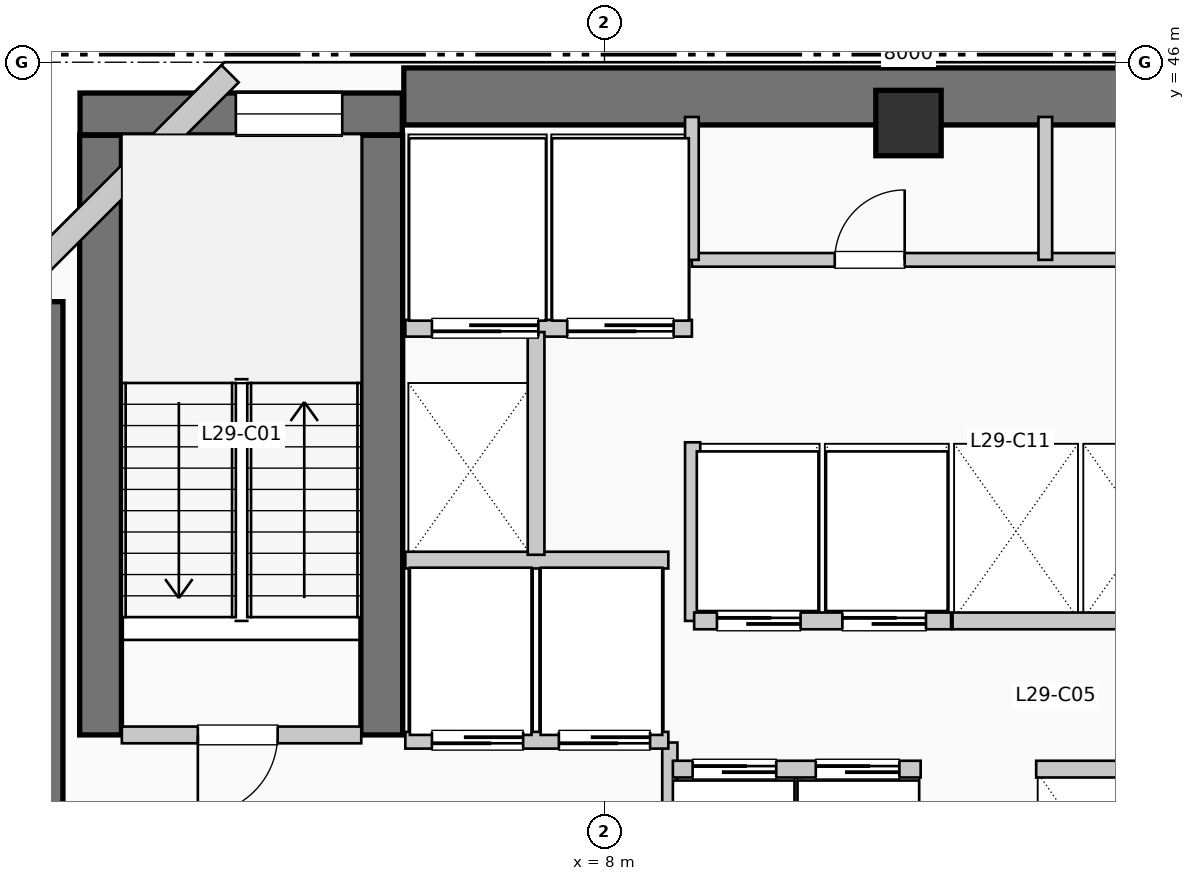
"""IFC4 building model, lengths in metres.
Left out: names, types, materials, properties, quantities, classifications, styles, units other than length and angle.
Written with IfcOpenShell. Run it as: python <this file> out.ifc"""

import sys

from ifc_helpers import new_model, si_unit, direction, frame, frame_2d, origin, origin_2d, place, context, subcontext, project, spatial, rectangle, extrude, element, fill, save


model = new_model("IFC4")
c1 = context("Model", 3, precision=1e-05, world=origin(), true_north=direction((0.0, 1.0)))
c2 = subcontext(c1, "Body", "Model", "MODEL_VIEW")
j1 = project(units=[si_unit("LENGTHUNIT", "METRE"), si_unit("PLANEANGLEUNIT", "RADIAN")], contexts=[c1])
p1 = place(None, origin())
s1 = spatial("IfcSite", under=j1, at=p1, CompositionType="ELEMENT")
p2 = place(p1, origin())
s2 = spatial("IfcBuilding", under=s1, at=p2, CompositionType="ELEMENT")
p3 = place(p2, frame((0.0, 0.0, 122.43)))
s3 = spatial("IfcBuildingStorey", under=s2, at=p3, CompositionType="ELEMENT", Elevation=122.43)
p4 = place(p3, frame((5.36, 45.55, 0.0), z_axis=(0.0, 0.0, 1.0), x_axis=(1.0, 0.0, 0.0)))
e1 = element("IfcWall", 1, at=p4, inside=s3, PredefinedType="SHEAR", context=c2, shape_type="SweptSolid", body=[
    extrude(rectangle(XDim=13.98, YDim=0.75, at=frame_2d((6.99, 0.0))), origin(), (0.0, 0.0, 1.0), 3.96),
])
p5 = place(p3, frame((0.5, 34.95, 0.0), z_axis=(0.0, 0.0, 1.0), x_axis=(0.0, 1.0, 0.0)))
e2 = element("IfcWall", 2, at=p5, inside=s3, PredefinedType="SHEAR", context=c2, shape_type="SweptSolid", body=[
    extrude(rectangle(XDim=7.9, YDim=0.75, at=frame_2d((3.95, 0.0))), origin(), (0.0, 0.0, 1.0), 3.96),
])
for number, where, z_axis, x_axis in (
    (3, (1.37, 37.15, 0.0), (0.0, 0.0, 1.0), (0.0, 1.0, 0.0)),
    (4, (5.07, 37.15, 0.0), (0.0, 0.0, 1.0), (0.0, 1.0, 0.0)),
):
    element("IfcWall", number, at=place(p3, frame(where, z_axis=z_axis, x_axis=x_axis)), inside=s3, PredefinedType="SHEAR", context=c2, shape_type="SweptSolid", body=[
        extrude(rectangle(XDim=7.89, YDim=0.55, at=frame_2d((3.945, 0.0))), origin(), (0.0, 0.0, 1.0), 3.96),
    ])
p6 = place(p3, frame((1.1, 45.32, 0.0), z_axis=(0.0, 0.0, 1.0), x_axis=(1.0, 0.0, 0.0)))
e5 = element("IfcWall", 5, at=p6, inside=s3, PredefinedType="SHEAR", context=c2, shape_type="SweptSolid", body=[
    extrude(rectangle(XDim=4.24, YDim=0.55, at=frame_2d((2.12, 0.0))), origin(), (0.0, 0.0, 1.0), 3.96),
])
p7 = place(p6, frame((2.05, 0.0, 1.05)))
e6 = element("IfcOpeningElement", 6, at=p7, cuts=e5, PredefinedType="OPENING", context=c2, shape_type="SweptSolid", body=[
    extrude(rectangle(XDim=1.4, YDim=1.8, at=frame_2d((0.7, 0.9))), frame((0.0, 0.285, 0.0), z_axis=(0.0, -1.0, 0.0), x_axis=(1.0, 0.0, 0.0)), (0.0, 0.0, 1.0), 0.57),
])
p8 = place(p3, frame((12.0, 45.2, 0.0), z_axis=(0.0, 0.0, 1.0), x_axis=(1.0, 0.0, 0.0)))
e7 = element("IfcColumn", 7, at=p8, inside=s3, PredefinedType="COLUMN", context=c2, shape_type="SweptSolid", body=[
    extrude(rectangle(XDim=0.86, YDim=0.86, at=origin_2d()), origin(), (0.0, 0.0, 1.0), 3.96),
])
p9 = place(p3, frame((3.074, 45.848, 0.0), z_axis=(0.0, 0.0, 1.0), x_axis=(-0.707106781187, -0.707106781187, 0.0)))
e8 = element("IfcWall", 8, at=p9, inside=s3, PredefinedType="SOLIDWALL", context=c2, shape_type="SweptSolid", body=[
    extrude(rectangle(XDim=4.133, YDim=0.32, at=frame_2d((2.066, 0.0))), origin(), (0.0, 0.0, 1.0), 3.71),
])
p10 = place(p3, frame((1.65, 37.15, 0.0), z_axis=(0.0, 0.0, 1.0), x_axis=(1.0, 0.0, 0.0)))
e9 = element("IfcWall", 9, at=p10, inside=s3, PredefinedType="PARTITIONING", context=c2, shape_type="SweptSolid", body=[
    extrude(rectangle(XDim=3.15, YDim=0.22, at=frame_2d((1.575, 0.0))), origin(), (0.0, 0.0, 1.0), 3.71),
])
p11 = place(p10, frame((2.05, 0.0, 0.0), z_axis=(0.0, 0.0, 1.0), x_axis=(-1.0, 0.0, 0.0)))
e10 = element("IfcOpeningElement", 10, at=p11, cuts=e9, PredefinedType="OPENING", context=c2, shape_type="SweptSolid", body=[
    extrude(rectangle(XDim=1.05, YDim=2.15, at=frame_2d((0.525, 1.075))), frame((0.0, 0.12, 0.0), z_axis=(0.0, -1.0, 0.0), x_axis=(1.0, 0.0, 0.0)), (0.0, 0.0, 1.0), 0.24),
])
p12 = place(p3, frame((8.86, 34.55, 0.0), z_axis=(0.0, 0.0, 1.0), x_axis=(0.0, 1.0, 0.0)))
e11 = element("IfcWall", 11, at=p12, inside=s3, PredefinedType="PARTITIONING", context=c2, shape_type="SweptSolid", body=[
    extrude(rectangle(XDim=2.5, YDim=0.2, at=frame_2d((1.25, 0.0))), origin(), (0.0, 0.0, 1.0), 3.71),
])
p13 = place(p3, frame((5.38, 37.08, 0.0), z_axis=(0.0, 0.0, 1.0), x_axis=(1.0, 0.0, 0.0)))
e12 = element("IfcWall", 12, at=p13, inside=s3, PredefinedType="PARTITIONING", context=c2, shape_type="SweptSolid", body=[
    extrude(rectangle(XDim=3.46, YDim=0.22, at=frame_2d((1.73, 0.0))), origin(), (0.0, 0.0, 1.0), 3.71),
])
p14 = place(p13, frame((1.55, 0.0, 0.0), z_axis=(0.0, 0.0, 1.0), x_axis=(-1.0, 0.0, 0.0)))
e13 = element("IfcOpeningElement", 13, at=p14, cuts=e12, PredefinedType="OPENING", context=c2, shape_type="SweptSolid", body=[
    extrude(rectangle(XDim=1.2, YDim=2.2, at=frame_2d((0.6, 1.1))), frame((0.0, 0.12, 0.0), z_axis=(0.0, -1.0, 0.0), x_axis=(1.0, 0.0, 0.0)), (0.0, 0.0, 1.0), 0.24),
])
p15 = place(p13, frame((3.22, 0.0, 0.0), z_axis=(0.0, 0.0, 1.0), x_axis=(-1.0, 0.0, 0.0)))
e14 = element("IfcOpeningElement", 14, at=p15, cuts=e12, PredefinedType="OPENING", context=c2, shape_type="SweptSolid", body=[
    extrude(rectangle(XDim=1.2, YDim=2.2, at=frame_2d((0.6, 1.1))), frame((0.0, 0.12, 0.0), z_axis=(0.0, -1.0, 0.0), x_axis=(1.0, 0.0, 0.0)), (0.0, 0.0, 1.0), 0.24),
])
p16 = place(p3, frame((5.38, 39.45, 0.0), z_axis=(0.0, 0.0, 1.0), x_axis=(1.0, 0.0, 0.0)))
e15 = element("IfcWall", 15, at=p16, inside=s3, PredefinedType="PARTITIONING", context=c2, shape_type="SweptSolid", body=[
    extrude(rectangle(XDim=3.46, YDim=0.22, at=frame_2d((1.73, 0.0))), origin(), (0.0, 0.0, 1.0), 3.71),
])
p17 = place(p3, frame((5.38, 42.5, 0.0), z_axis=(0.0, 0.0, 1.0), x_axis=(1.0, 0.0, 0.0)))
e16 = element("IfcWall", 16, at=p17, inside=s3, PredefinedType="PARTITIONING", context=c2, shape_type="SweptSolid", body=[
    extrude(rectangle(XDim=3.77, YDim=0.22, at=frame_2d((1.885, 0.0))), origin(), (0.0, 0.0, 1.0), 3.71),
])
p18 = place(p17, frame((1.75, 0.0, 0.0), z_axis=(0.0, 0.0, 1.0), x_axis=(-1.0, 0.0, 0.0)))
e17 = element("IfcOpeningElement", 17, at=p18, cuts=e16, PredefinedType="OPENING", context=c2, shape_type="SweptSolid", body=[
    extrude(rectangle(XDim=1.4, YDim=2.2, at=frame_2d((0.7, 1.1))), frame((0.0, 0.12, 0.0), z_axis=(0.0, -1.0, 0.0), x_axis=(1.0, 0.0, 0.0)), (0.0, 0.0, 1.0), 0.24),
])
p19 = place(p17, frame((3.53, 0.0, 0.0), z_axis=(0.0, 0.0, 1.0), x_axis=(-1.0, 0.0, 0.0)))
e18 = element("IfcOpeningElement", 18, at=p19, cuts=e16, PredefinedType="OPENING", context=c2, shape_type="SweptSolid", body=[
    extrude(rectangle(XDim=1.4, YDim=2.2, at=frame_2d((0.7, 1.1))), frame((0.0, 0.12, 0.0), z_axis=(0.0, -1.0, 0.0), x_axis=(1.0, 0.0, 0.0)), (0.0, 0.0, 1.0), 0.24),
])
p20 = place(p3, frame((7.1, 39.52, 0.0), z_axis=(0.0, 0.0, 1.0), x_axis=(0.0, 1.0, 0.0)))
e19 = element("IfcWall", 19, at=p20, inside=s3, PredefinedType="PARTITIONING", context=c2, shape_type="SweptSolid", body=[
    extrude(rectangle(XDim=2.93, YDim=0.22, at=frame_2d((1.465, 0.0))), origin(), (0.0, 0.0, 1.0), 3.71),
])
p21 = place(p3, frame((9.16, 38.65, 0.0), z_axis=(0.0, 0.0, 1.0), x_axis=(0.0, 1.0, 0.0)))
e20 = element("IfcWall", 20, at=p21, inside=s3, PredefinedType="PARTITIONING", context=c2, shape_type="SweptSolid", body=[
    extrude(rectangle(XDim=2.35, YDim=0.2, at=frame_2d((1.175, 0.0))), origin(), (0.0, 0.0, 1.0), 3.71),
])
p22 = place(p3, frame((8.9, 36.7, 0.0), z_axis=(0.0, 0.0, 1.0), x_axis=(1.0, 0.0, 0.0)))
e21 = element("IfcWall", 21, at=p22, inside=s3, PredefinedType="PARTITIONING", context=c2, shape_type="SweptSolid", body=[
    extrude(rectangle(XDim=3.26, YDim=0.22, at=frame_2d((1.63, 0.0))), origin(), (0.0, 0.0, 1.0), 3.71),
])
p23 = place(p22, frame((0.26, 0.0, 0.0)))
e22 = element("IfcOpeningElement", 22, at=p23, cuts=e21, PredefinedType="OPENING", context=c2, shape_type="SweptSolid", body=[
    extrude(rectangle(XDim=1.1, YDim=2.2, at=frame_2d((0.55, 1.1))), frame((0.0, 0.12, 0.0), z_axis=(0.0, -1.0, 0.0), x_axis=(1.0, 0.0, 0.0)), (0.0, 0.0, 1.0), 0.24),
])
p24 = place(p22, frame((1.88, 0.0, 0.0)))
e23 = element("IfcOpeningElement", 23, at=p24, cuts=e21, PredefinedType="OPENING", context=c2, shape_type="SweptSolid", body=[
    extrude(rectangle(XDim=1.1, YDim=2.2, at=frame_2d((0.55, 1.1))), frame((0.0, 0.12, 0.0), z_axis=(0.0, -1.0, 0.0), x_axis=(1.0, 0.0, 0.0)), (0.0, 0.0, 1.0), 0.24),
])
p25 = place(p3, frame((9.18, 38.65, 0.0), z_axis=(0.0, 0.0, 1.0), x_axis=(1.0, 0.0, 0.0)))
e24 = element("IfcWall", 24, at=p25, inside=s3, PredefinedType="PARTITIONING", context=c2, shape_type="SweptSolid", body=[
    extrude(rectangle(XDim=3.38, YDim=0.22, at=frame_2d((1.69, 0.0))), origin(), (0.0, 0.0, 1.0), 3.71),
])
p26 = place(p25, frame((0.3, 0.0, 0.0)))
e25 = element("IfcOpeningElement", 25, at=p26, cuts=e24, PredefinedType="OPENING", context=c2, shape_type="SweptSolid", body=[
    extrude(rectangle(XDim=1.1, YDim=2.2, at=frame_2d((0.55, 1.1))), frame((0.0, 0.12, 0.0), z_axis=(0.0, -1.0, 0.0), x_axis=(1.0, 0.0, 0.0)), (0.0, 0.0, 1.0), 0.24),
])
p27 = place(p25, frame((1.95, 0.0, 0.0)))
e26 = element("IfcOpeningElement", 26, at=p27, cuts=e24, PredefinedType="OPENING", context=c2, shape_type="SweptSolid", body=[
    extrude(rectangle(XDim=1.1, YDim=2.2, at=frame_2d((0.55, 1.1))), frame((0.0, 0.12, 0.0), z_axis=(0.0, -1.0, 0.0), x_axis=(1.0, 0.0, 0.0)), (0.0, 0.0, 1.0), 0.24),
])
p28 = place(p3, frame((13.68, 36.7, 0.0), z_axis=(0.0, 0.0, 1.0), x_axis=(1.0, 0.0, 0.0)))
e27 = element("IfcWall", 27, at=p28, inside=s3, PredefinedType="PARTITIONING", context=c2, shape_type="SweptSolid", body=[
    extrude(rectangle(XDim=3.28, YDim=0.22, at=frame_2d((1.64, 0.0))), origin(), (0.0, 0.0, 1.0), 3.71),
])
p29 = place(p3, frame((12.58, 38.65, 0.0), z_axis=(0.0, 0.0, 1.0), x_axis=(1.0, 0.0, 0.0)))
e28 = element("IfcWall", 28, at=p29, inside=s3, PredefinedType="PARTITIONING", context=c2, shape_type="SweptSolid", body=[
    extrude(rectangle(XDim=3.38, YDim=0.22, at=frame_2d((1.69, 0.0))), origin(), (0.0, 0.0, 1.0), 3.71),
])
p30 = place(p3, frame((9.15, 43.4, 0.0), z_axis=(0.0, 0.0, 1.0), x_axis=(1.0, 0.0, 0.0)))
e29 = element("IfcWall", 29, at=p30, inside=s3, PredefinedType="PLUMBINGWALL", context=c2, shape_type="SweptSolid", body=[
    extrude(rectangle(XDim=9.33, YDim=0.18, at=frame_2d((4.665, 0.0))), origin(), (0.0, 0.0, 1.0), 3.71),
])
p31 = place(p30, frame((1.88, 0.0, 0.0)))
e30 = element("IfcOpeningElement", 30, at=p31, cuts=e29, PredefinedType="OPENING", context=c2, shape_type="SweptSolid", body=[
    extrude(rectangle(XDim=0.92, YDim=2.1, at=frame_2d((0.46, 1.05))), frame((0.0, 0.1, 0.0), z_axis=(0.0, -1.0, 0.0), x_axis=(1.0, 0.0, 0.0)), (0.0, 0.0, 1.0), 0.2),
])
p32 = place(p30, frame((6.515, 0.0, 0.0)))
e31 = element("IfcOpeningElement", 31, at=p32, cuts=e29, PredefinedType="OPENING", context=c2, shape_type="SweptSolid", body=[
    extrude(rectangle(XDim=0.92, YDim=2.1, at=frame_2d((0.46, 1.05))), frame((0.0, 0.1, 0.0), z_axis=(0.0, -1.0, 0.0), x_axis=(1.0, 0.0, 0.0)), (0.0, 0.0, 1.0), 0.2),
])
for number, where, z_axis, x_axis in (
    (32, (9.15, 43.4, 0.0), (0.0, 0.0, 1.0), (0.0, 1.0, 0.0)),
    (33, (13.8, 43.4, 0.0), (0.0, 0.0, 1.0), (0.0, 1.0, 0.0)),
):
    element("IfcWall", number, at=place(p3, frame(where, z_axis=z_axis, x_axis=x_axis)), inside=s3, PredefinedType="PLUMBINGWALL", context=c2, shape_type="SweptSolid", body=[
        extrude(rectangle(XDim=1.88, YDim=0.18, at=frame_2d((0.94, 0.0))), origin(), (0.0, 0.0, 1.0), 3.71),
    ])
p33 = place(p7, origin())
e34 = element("IfcWindow", 34, at=p33, inside=s3, PartitioningType="SINGLE_PANEL", PredefinedType="WINDOW", context=c2, shape_type="SweptSolid", body=[
    extrude(rectangle(XDim=1.4, YDim=1.8, at=frame_2d((0.7, 0.9))), frame((0.0, 0.03, 0.0), z_axis=(0.0, -1.0, 0.0), x_axis=(1.0, 0.0, 0.0)), (0.0, 0.0, 1.0), 0.06),
])
fill(e6, e34)
p34 = place(p11, origin())
e35 = element("IfcDoor", 35, at=p34, inside=s3, OperationType="SINGLE_SWING_LEFT", PredefinedType="DOOR", context=c2, shape_type="SweptSolid", body=[
    extrude(rectangle(XDim=1.05, YDim=2.15, at=frame_2d((0.525, 1.075))), frame((0.0, 0.025, 0.0), z_axis=(0.0, -1.0, 0.0), x_axis=(1.0, 0.0, 0.0)), (0.0, 0.0, 1.0), 0.05),
])
fill(e10, e35)
p35 = place(p14, origin())
e36 = element("IfcDoor", 36, at=p35, inside=s3, OperationType="SLIDING_TO_RIGHT", PredefinedType="DOOR", context=c2, shape_type="SweptSolid", body=[
    extrude(rectangle(XDim=1.2, YDim=2.2, at=frame_2d((0.6, 1.1))), frame((0.0, 0.025, 0.0), z_axis=(0.0, -1.0, 0.0), x_axis=(1.0, 0.0, 0.0)), (0.0, 0.0, 1.0), 0.05),
])
fill(e13, e36)
p36 = place(p15, origin())
e37 = element("IfcDoor", 37, at=p36, inside=s3, OperationType="SLIDING_TO_RIGHT", PredefinedType="DOOR", context=c2, shape_type="SweptSolid", body=[
    extrude(rectangle(XDim=1.2, YDim=2.2, at=frame_2d((0.6, 1.1))), frame((0.0, 0.025, 0.0), z_axis=(0.0, -1.0, 0.0), x_axis=(1.0, 0.0, 0.0)), (0.0, 0.0, 1.0), 0.05),
])
fill(e14, e37)
p37 = place(p18, origin())
e38 = element("IfcDoor", 38, at=p37, inside=s3, OperationType="SLIDING_TO_LEFT", PredefinedType="DOOR", context=c2, shape_type="SweptSolid", body=[
    extrude(rectangle(XDim=1.4, YDim=2.2, at=frame_2d((0.7, 1.1))), frame((0.0, 0.025, 0.0), z_axis=(0.0, -1.0, 0.0), x_axis=(1.0, 0.0, 0.0)), (0.0, 0.0, 1.0), 0.05),
])
fill(e17, e38)
p38 = place(p19, origin())
e39 = element("IfcDoor", 39, at=p38, inside=s3, OperationType="SLIDING_TO_LEFT", PredefinedType="DOOR", context=c2, shape_type="SweptSolid", body=[
    extrude(rectangle(XDim=1.4, YDim=2.2, at=frame_2d((0.7, 1.1))), frame((0.0, 0.025, 0.0), z_axis=(0.0, -1.0, 0.0), x_axis=(1.0, 0.0, 0.0)), (0.0, 0.0, 1.0), 0.05),
])
fill(e18, e39)
p39 = place(p23, origin())
e40 = element("IfcDoor", 40, at=p39, inside=s3, OperationType="SLIDING_TO_LEFT", PredefinedType="DOOR", context=c2, shape_type="SweptSolid", body=[
    extrude(rectangle(XDim=1.1, YDim=2.2, at=frame_2d((0.55, 1.1))), frame((0.0, 0.025, 0.0), z_axis=(0.0, -1.0, 0.0), x_axis=(1.0, 0.0, 0.0)), (0.0, 0.0, 1.0), 0.05),
])
fill(e22, e40)
p40 = place(p24, origin())
e41 = element("IfcDoor", 41, at=p40, inside=s3, OperationType="SLIDING_TO_LEFT", PredefinedType="DOOR", context=c2, shape_type="SweptSolid", body=[
    extrude(rectangle(XDim=1.1, YDim=2.2, at=frame_2d((0.55, 1.1))), frame((0.0, 0.025, 0.0), z_axis=(0.0, -1.0, 0.0), x_axis=(1.0, 0.0, 0.0)), (0.0, 0.0, 1.0), 0.05),
])
fill(e23, e41)
p41 = place(p26, origin())
e42 = element("IfcDoor", 42, at=p41, inside=s3, OperationType="SLIDING_TO_LEFT", PredefinedType="DOOR", context=c2, shape_type="SweptSolid", body=[
    extrude(rectangle(XDim=1.1, YDim=2.2, at=frame_2d((0.55, 1.1))), frame((0.0, 0.025, 0.0), z_axis=(0.0, -1.0, 0.0), x_axis=(1.0, 0.0, 0.0)), (0.0, 0.0, 1.0), 0.05),
])
fill(e25, e42)
p42 = place(p27, origin())
e43 = element("IfcDoor", 43, at=p42, inside=s3, OperationType="SLIDING_TO_LEFT", PredefinedType="DOOR", context=c2, shape_type="SweptSolid", body=[
    extrude(rectangle(XDim=1.1, YDim=2.2, at=frame_2d((0.55, 1.1))), frame((0.0, 0.025, 0.0), z_axis=(0.0, -1.0, 0.0), x_axis=(1.0, 0.0, 0.0)), (0.0, 0.0, 1.0), 0.05),
])
fill(e26, e43)
p43 = place(p31, origin())
e44 = element("IfcDoor", 44, at=p43, inside=s3, OperationType="SINGLE_SWING_RIGHT", PredefinedType="DOOR", context=c2, shape_type="SweptSolid", body=[
    extrude(rectangle(XDim=0.92, YDim=2.1, at=frame_2d((0.46, 1.05))), frame((0.0, 0.025, 0.0), z_axis=(0.0, -1.0, 0.0), x_axis=(1.0, 0.0, 0.0)), (0.0, 0.0, 1.0), 0.05),
])
fill(e30, e44)
save(model, sys.argv[1])
